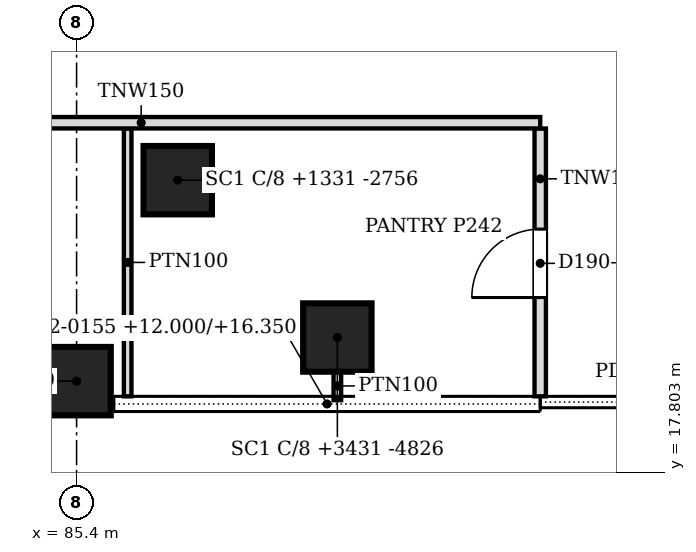
"""IFC4 building model, lengths in metres.
Left out: names, types, materials, properties, quantities, classifications, styles, units other than length and angle.
Written with IfcOpenShell. Run it as: python <this file> out.ifc"""

import sys

from ifc_helpers import new_model, si_unit, direction, frame, frame_2d, origin, origin_2d, place, context, subcontext, project, spatial, rectangle, extrude, source, transform, mapped, element, fill, save


model = new_model("IFC4")
c1 = context("Model", 3, precision=1e-05, world=origin(), true_north=direction((0.0, 1.0)))
c2 = subcontext(c1, "Body", "Model", "MODEL_VIEW")
j1 = project(units=[si_unit("LENGTHUNIT", "METRE"), si_unit("PLANEANGLEUNIT", "RADIAN")], contexts=[c1])
p1 = place(None, origin())
s1 = spatial("IfcSite", under=j1, at=p1, CompositionType="ELEMENT")
p2 = place(p1, origin())
s2 = spatial("IfcBuilding", under=s1, at=p2, CompositionType="ELEMENT")
p3 = place(p2, frame((0.0, 0.0, 12.0)))
s3 = spatial("IfcBuildingStorey", under=s2, at=p3, CompositionType="ELEMENT", Elevation=12.0)
for number, where, z_axis, x_axis in (
    (1, (86.731, 21.644, 0.0), (0.0, 0.0, 1.0), (1.0, 0.0, 0.0)),
    (2, (88.831, 19.574, 0.0), (0.0, 0.0, 1.0), (1.0, 0.0, 0.0)),
):
    element("IfcColumn", number, at=place(p3, frame(where, z_axis=z_axis, x_axis=x_axis)), inside=s3, PredefinedType="COLUMN", context=c2, shape_type="SweptSolid", body=[
        extrude(rectangle(XDim=0.9, YDim=0.9, at=origin_2d()), origin(), (0.0, 0.0, 1.0), 4.6),
    ])
p4 = place(p3, frame((85.4, 19.0, 0.0), z_axis=(0.0, 0.0, 1.0), x_axis=(1.0, 0.0, 0.0)))
e3 = element("IfcColumn", 3, at=p4, inside=s3, PredefinedType="COLUMN", context=c2, shape_type="SweptSolid", body=[
    extrude(rectangle(XDim=0.9, YDim=0.9, at=origin_2d()), origin(), (0.0, 0.0, 1.0), 4.35),
])
p5 = place(p3, frame((86.072, 18.8, 0.0), z_axis=(0.0, 0.0, 1.0), x_axis=(0.0, 1.0, 0.0)))
e4 = element("IfcWall", 4, at=p5, inside=s3, PredefinedType="PARTITIONING", context=c2, shape_type="SweptSolid", body=[
    extrude(rectangle(XDim=3.524, YDim=0.1, at=frame_2d((1.762, 0.0))), origin(), (0.0, 0.0, 1.0), 3.672),
])
p6 = place(p3, frame((91.5, 18.8, 0.0), z_axis=(0.0, 0.0, 1.0), x_axis=(0.0, 1.0, 0.0)))
e5 = element("IfcWall", 5, at=p6, inside=s3, PredefinedType="PARTITIONING", context=c2, shape_type="SweptSolid", body=[
    extrude(rectangle(XDim=3.524, YDim=0.15, at=frame_2d((1.762, 0.0))), origin(), (0.0, 0.0, 1.0), 3.672),
])
m1 = source(origin(), c2, "Body", "SweptSolid", [
    extrude(rectangle(XDim=0.9, YDim=2.1, at=frame_2d((0.45, 1.05))), frame((0.0, 0.085, 0.0), z_axis=(0.0, -1.0, 0.0), x_axis=(1.0, 0.0, 0.0)), (0.0, 0.0, 1.0), 0.17),
])
p7 = place(p6, frame((1.3, 0.0, 0.0)))
e6 = element("IfcOpeningElement", 6, at=p7, cuts=e5, PredefinedType="OPENING", context=c2, shape_type="MappedRepresentation", body=[
    mapped(m1, transform((0.0, 0.0, 0.0), scale=1.0)),
])
p8 = place(p3, frame((88.831, 19.124, 0.0), z_axis=(0.0, 0.0, 1.0), x_axis=(0.0, -1.0, 0.0)))
e7 = element("IfcWall", 7, at=p8, inside=s3, PredefinedType="PARTITIONING", context=c2, shape_type="SweptSolid", body=[
    extrude(rectangle(XDim=0.374, YDim=0.1, at=frame_2d((0.187, 0.0))), origin(), (0.0, 0.0, 1.0), 3.672),
])
p9 = place(p3, frame((91.5, 22.4, 0.0), z_axis=(0.0, 0.0, 1.0), x_axis=(-1.0, 0.0, 0.0)))
e8 = element("IfcWall", 8, at=p9, inside=s3, PredefinedType="PARTITIONING", context=c2, shape_type="SweptSolid", body=[
    extrude(rectangle(XDim=10.5, YDim=0.15, at=frame_2d((5.25, 0.0))), origin(), (0.0, 0.0, 1.0), 3.672),
])
p10 = place(p9, frame((7.5, 0.0, 0.0)))
e9 = element("IfcOpeningElement", 9, at=p10, cuts=e8, PredefinedType="OPENING", context=c2, shape_type="MappedRepresentation", body=[
    mapped(m1, transform((0.0, 0.0, 0.0), scale=1.0)),
])
m2 = source(origin(), c2, "Body", "SweptSolid", [
    extrude(rectangle(XDim=0.9, YDim=2.1, at=frame_2d((0.45, 1.05))), frame((0.0, 0.025, 0.0), z_axis=(0.0, -1.0, 0.0), x_axis=(1.0, 0.0, 0.0)), (0.0, 0.0, 1.0), 0.05),
])
p11 = place(p7, origin())
e10 = element("IfcDoor", 10, at=p11, inside=s3, OperationType="SINGLE_SWING_LEFT", PredefinedType="DOOR", context=c2, shape_type="MappedRepresentation", body=[
    mapped(m2, transform((0.0, 0.0, 0.0), scale=1.0)),
])
fill(e6, e10)
save(model, sys.argv[1])
